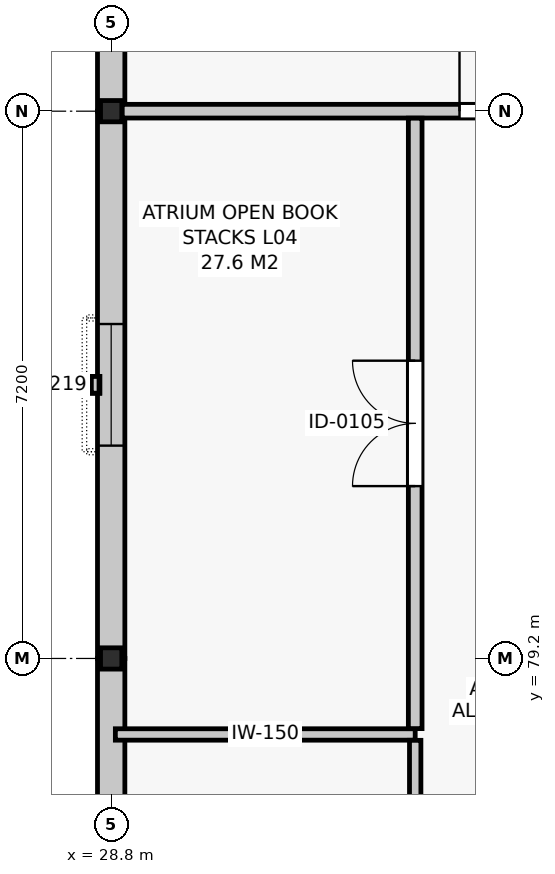
"""IFC4 building model, lengths in metres.
Left out: names, types, materials, properties, quantities, classifications, styles, units other than length and angle.
Written with IfcOpenShell. Run it as: python <this file> out.ifc"""

import sys

from ifc_helpers import new_model, si_unit, direction, frame, frame_2d, origin, origin_2d, place, context, subcontext, project, spatial, rectangle, i_section, extrude, element, fill, save


model = new_model("IFC4")
c1 = context("Model", 3, precision=1e-05, world=origin(), true_north=direction((0.0, 1.0)))
c2 = subcontext(c1, "Body", "Model", "MODEL_VIEW")
j1 = project(units=[si_unit("LENGTHUNIT", "METRE"), si_unit("PLANEANGLEUNIT", "RADIAN")], contexts=[c1])
p1 = place(None, origin())
s1 = spatial("IfcSite", under=j1, at=p1, CompositionType="ELEMENT")
p2 = place(p1, origin())
s2 = spatial("IfcBuilding", under=s1, at=p2, CompositionType="ELEMENT")
p3 = place(p2, frame((0.0, 0.0, 18.6)))
s3 = spatial("IfcBuildingStorey", under=s2, at=p3, CompositionType="ELEMENT", Elevation=18.6)
for number, where, z_axis, x_axis in (
    (1, (28.8, 79.2, 0.0), (0.0, 0.0, 1.0), (1.0, 0.0, 0.0)),
    (2, (28.8, 86.4, 0.0), (0.0, 0.0, 1.0), (1.0, 0.0, 0.0)),
):
    element("IfcColumn", number, at=place(p3, frame(where, z_axis=z_axis, x_axis=x_axis)), inside=s3, PredefinedType="COLUMN", context=c2, shape_type="SweptSolid", body=[
        extrude(i_section(OverallWidth=0.28, OverallDepth=0.28, WebThickness=0.01, FlangeThickness=0.018, FilletRadius=0.024, at=origin_2d()), origin(), (0.0, 0.0, 1.0), 4.2),
    ])
p4 = place(p3, frame((28.8, 93.6, 0.0), z_axis=(0.0, 0.0, 1.0), x_axis=(0.0, -1.0, 0.0)))
e3 = element("IfcWall", 3, at=p4, inside=s3, PredefinedType="SOLIDWALL", context=c2, shape_type="SweptSolid", body=[
    extrude(rectangle(XDim=7.2, YDim=0.36, at=frame_2d((3.6, 0.0))), origin(), (0.0, 0.0, 1.0), 3.24),
])
p5 = place(p4, frame((2.8, 0.0, 0.95)))
e4 = element("IfcOpeningElement", 4, at=p5, cuts=e3, PredefinedType="OPENING", context=c2, shape_type="SweptSolid", body=[
    extrude(rectangle(XDim=1.6, YDim=1.75, at=frame_2d((0.8, 0.875))), frame((0.0, 0.192, 0.0), z_axis=(0.0, -1.0, 0.0), x_axis=(1.0, 0.0, 0.0)), (0.0, 0.0, 1.0), 0.384),
])
p6 = place(p3, frame((28.8, 86.4, 0.0), z_axis=(0.0, 0.0, 1.0), x_axis=(0.0, -1.0, 0.0)))
e5 = element("IfcWall", 5, at=p6, inside=s3, PredefinedType="SOLIDWALL", context=c2, shape_type="SweptSolid", body=[
    extrude(rectangle(XDim=7.2, YDim=0.36, at=frame_2d((3.6, 0.0))), origin(), (0.0, 0.0, 1.0), 3.24),
])
p7 = place(p6, frame((2.8, 0.0, 0.95)))
e6 = element("IfcOpeningElement", 6, at=p7, cuts=e5, PredefinedType="OPENING", context=c2, shape_type="SweptSolid", body=[
    extrude(rectangle(XDim=1.6, YDim=1.75, at=frame_2d((0.8, 0.875))), frame((0.0, 0.192, 0.0), z_axis=(0.0, -1.0, 0.0), x_axis=(1.0, 0.0, 0.0)), (0.0, 0.0, 1.0), 0.384),
])
p8 = place(p3, frame((28.8, 79.2, 0.0), z_axis=(0.0, 0.0, 1.0), x_axis=(0.0, -1.0, 0.0)))
e7 = element("IfcWall", 7, at=p8, inside=s3, PredefinedType="SOLIDWALL", context=c2, shape_type="SweptSolid", body=[
    extrude(rectangle(XDim=7.2, YDim=0.36, at=frame_2d((3.6, 0.0))), origin(), (0.0, 0.0, 1.0), 3.24),
])
p9 = place(p8, frame((2.8, 0.0, 0.95)))
e8 = element("IfcOpeningElement", 8, at=p9, cuts=e7, PredefinedType="OPENING", context=c2, shape_type="SweptSolid", body=[
    extrude(rectangle(XDim=1.6, YDim=1.75, at=frame_2d((0.8, 0.875))), frame((0.0, 0.192, 0.0), z_axis=(0.0, -1.0, 0.0), x_axis=(1.0, 0.0, 0.0)), (0.0, 0.0, 1.0), 0.384),
])
p10 = place(p3, frame((28.855, 78.2, 0.0), z_axis=(0.0, 0.0, 1.0), x_axis=(1.0, 0.0, 0.0)))
e9 = element("IfcWall", 9, at=p10, inside=s3, PredefinedType="PARTITIONING", context=c2, shape_type="SweptSolid", body=[
    extrude(rectangle(XDim=3.945, YDim=0.15, at=frame_2d((1.973, 0.0))), origin(), (0.0, 0.0, 1.0), 3.395),
])
p11 = place(p3, frame((28.944, 86.4, 0.0), z_axis=(0.0, 0.0, 1.0), x_axis=(1.0, 0.0, 0.0)))
e10 = element("IfcWall", 10, at=p11, inside=s3, PredefinedType="PARTITIONING", context=c2, shape_type="SweptSolid", body=[
    extrude(rectangle(XDim=6.912, YDim=0.18, at=frame_2d((3.456, 0.0))), origin(), (0.0, 0.0, 1.0), 3.595),
])
p12 = place(p11, frame((4.439, 0.0, 0.0)))
e11 = element("IfcOpeningElement", 11, at=p12, cuts=e10, PredefinedType="OPENING", context=c2, shape_type="SweptSolid", body=[
    extrude(rectangle(XDim=1.65, YDim=2.25, at=frame_2d((0.825, 1.125))), frame((0.0, 0.102, 0.0), z_axis=(0.0, -1.0, 0.0), x_axis=(1.0, 0.0, 0.0)), (0.0, 0.0, 1.0), 0.204),
])
p13 = place(p3, frame((32.8, 72.077, 0.0), z_axis=(0.0, 0.0, 1.0), x_axis=(0.0, 1.0, 0.0)))
e12 = element("IfcWall", 12, at=p13, inside=s3, PredefinedType="PARTITIONING", context=c2, shape_type="SweptSolid", body=[
    extrude(rectangle(XDim=6.046, YDim=0.15, at=frame_2d((3.023, 0.0))), origin(), (0.0, 0.0, 1.0), 3.635),
])
p14 = place(p13, frame((2.533, 0.0, 0.0)))
e13 = element("IfcOpeningElement", 13, at=p14, cuts=e12, PredefinedType="OPENING", context=c2, shape_type="SweptSolid", body=[
    extrude(rectangle(XDim=0.98, YDim=2.1, at=frame_2d((0.49, 1.05))), frame((0.0, 0.087, 0.0), z_axis=(0.0, -1.0, 0.0), x_axis=(1.0, 0.0, 0.0)), (0.0, 0.0, 1.0), 0.174),
])
p15 = place(p3, frame((32.8, 78.277, 0.0), z_axis=(0.0, 0.0, 1.0), x_axis=(0.0, 1.0, 0.0)))
e14 = element("IfcWall", 14, at=p15, inside=s3, PredefinedType="PARTITIONING", context=c2, shape_type="SweptSolid", body=[
    extrude(rectangle(XDim=8.031, YDim=0.18, at=frame_2d((4.016, 0.0))), origin(), (0.0, 0.0, 1.0), 3.635),
])
p16 = place(p15, frame((3.19, 0.0, 0.0)))
e15 = element("IfcOpeningElement", 15, at=p16, cuts=e14, PredefinedType="OPENING", context=c2, shape_type="SweptSolid", body=[
    extrude(rectangle(XDim=1.65, YDim=2.25, at=frame_2d((0.825, 1.125))), frame((0.0, 0.102, 0.0), z_axis=(0.0, -1.0, 0.0), x_axis=(1.0, 0.0, 0.0)), (0.0, 0.0, 1.0), 0.204),
])
p17 = place(p7, origin())
e16 = element("IfcWindow", 16, at=p17, inside=s3, PartitioningType="SINGLE_PANEL", PredefinedType="WINDOW", context=c2, shape_type="SweptSolid", body=[
    extrude(rectangle(XDim=1.6, YDim=1.75, at=frame_2d((0.8, 0.875))), frame((0.0, 0.03, 0.0), z_axis=(0.0, -1.0, 0.0), x_axis=(1.0, 0.0, 0.0)), (0.0, 0.0, 1.0), 0.06),
])
fill(e6, e16)
p18 = place(p12, origin())
e17 = element("IfcDoor", 17, at=p18, inside=s3, OperationType="DOUBLE_DOOR_SINGLE_SWING", PredefinedType="DOOR", context=c2, shape_type="SweptSolid", body=[
    extrude(rectangle(XDim=1.65, YDim=2.25, at=frame_2d((0.825, 1.125))), frame((0.0, 0.025, 0.0), z_axis=(0.0, -1.0, 0.0), x_axis=(1.0, 0.0, 0.0)), (0.0, 0.0, 1.0), 0.05),
])
fill(e11, e17)
p19 = place(p16, origin())
e18 = element("IfcDoor", 18, at=p19, inside=s3, OperationType="DOUBLE_DOOR_SINGLE_SWING", PredefinedType="DOOR", context=c2, shape_type="SweptSolid", body=[
    extrude(rectangle(XDim=1.65, YDim=2.25, at=frame_2d((0.825, 1.125))), frame((0.0, 0.025, 0.0), z_axis=(0.0, -1.0, 0.0), x_axis=(1.0, 0.0, 0.0)), (0.0, 0.0, 1.0), 0.05),
])
fill(e15, e18)
save(model, sys.argv[1])
